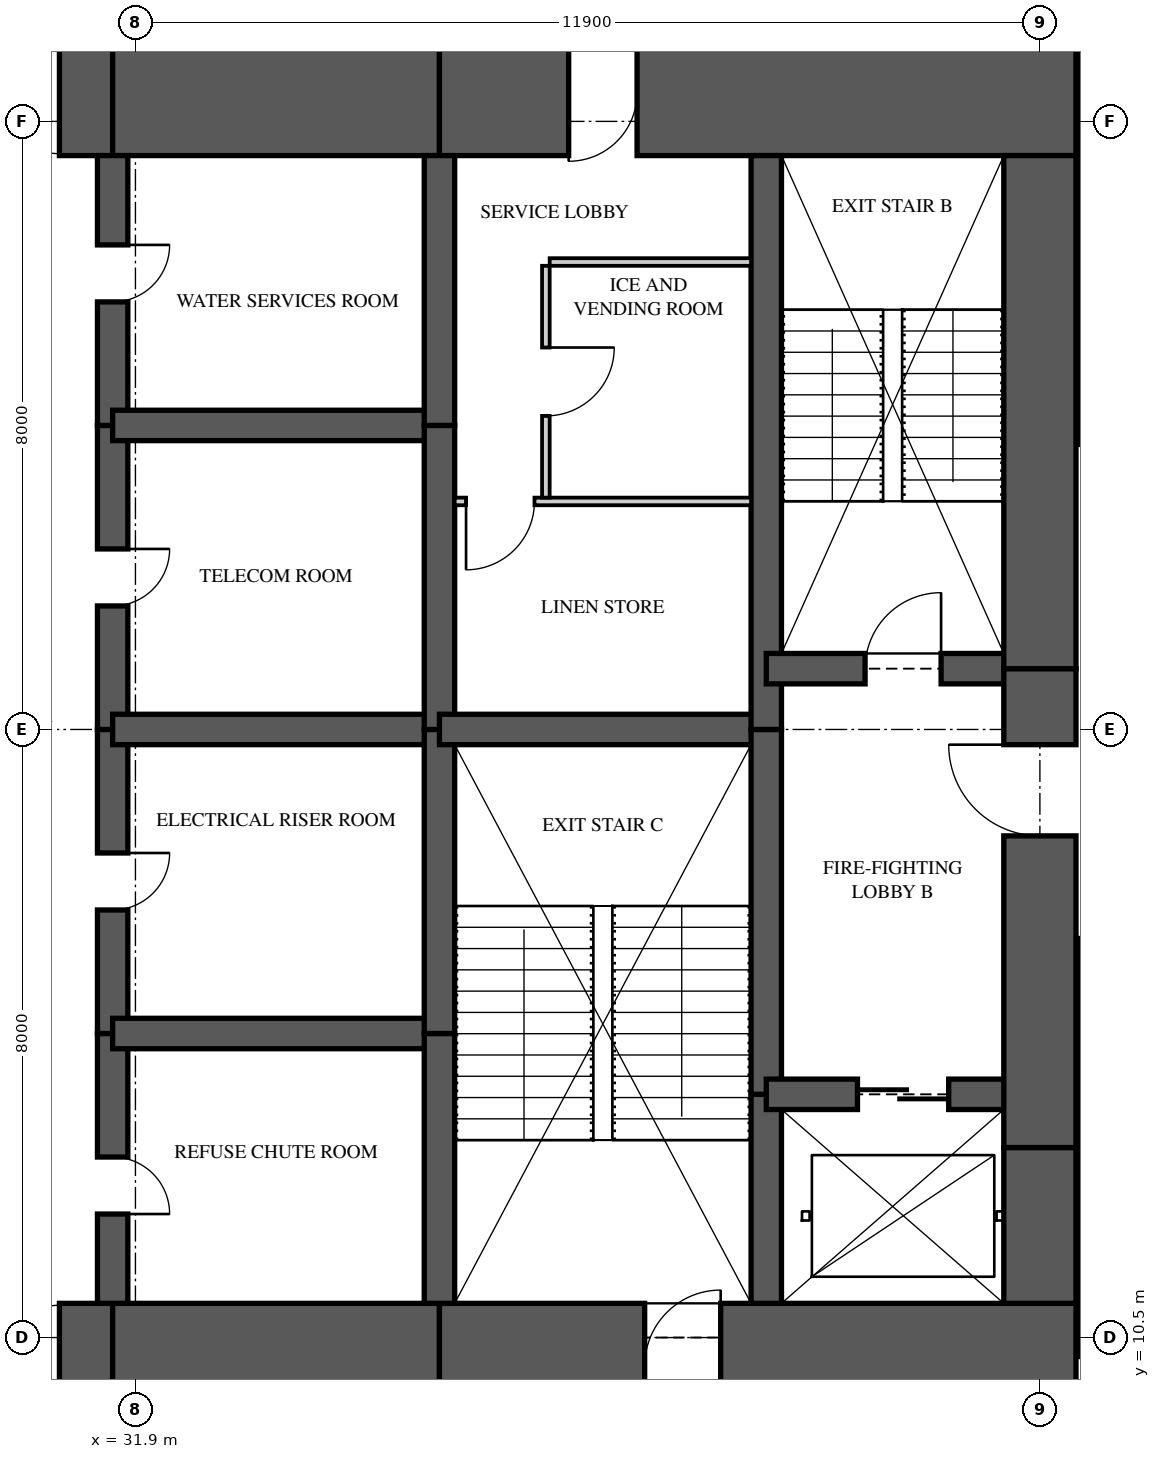
"""IFC4 building model, lengths in metres.
Left out: names, types, materials, properties, quantities, classifications, styles, units other than length and angle.
Written with IfcOpenShell. Run it as: python <this file> out.ifc"""

import sys

from ifc_helpers import new_model, si_unit, direction, frame, frame_2d, origin, place, context, subcontext, project, spatial, rectangle, extrude, element, fill, save


model = new_model("IFC4")
c1 = context("Model", 3, precision=1e-05, world=origin(), true_north=direction((0.0, 1.0)))
c2 = subcontext(c1, "Body", "Model", "MODEL_VIEW")
j1 = project(units=[si_unit("LENGTHUNIT", "METRE"), si_unit("PLANEANGLEUNIT", "RADIAN")], contexts=[c1])
p1 = place(None, origin())
s1 = spatial("IfcSite", under=j1, at=p1, CompositionType="ELEMENT")
p2 = place(p1, origin())
s2 = spatial("IfcBuilding", under=s1, at=p2, CompositionType="ELEMENT")
p3 = place(p2, frame((0.0, 0.0, 67.9)))
s3 = spatial("IfcBuildingStorey", under=s2, at=p3, CompositionType="ELEMENT", Elevation=67.9)
p4 = place(p3, frame((26.0, 10.125, 0.0), z_axis=(0.0, 0.0, 1.0), x_axis=(1.0, 0.0, 0.0)))
e1 = element("IfcWall", 1, at=p4, inside=s3, PredefinedType="SHEAR", context=c2, shape_type="SweptSolid", body=[
    extrude(rectangle(XDim=5.6, YDim=1.65, at=frame_2d((2.8, 0.0))), origin(), (0.0, 0.0, 1.0), 3.35),
])
p5 = place(p4, frame((3.3, 0.0, 0.0)))
e2 = element("IfcOpeningElement", 2, at=p5, cuts=e1, PredefinedType="OPENING", context=c2, shape_type="SweptSolid", body=[
    extrude(rectangle(XDim=1.6, YDim=2.1, at=frame_2d((0.8, 1.05))), frame((0.0, 0.835, 0.0), z_axis=(0.0, -1.0, 0.0), x_axis=(1.0, 0.0, 0.0)), (0.0, 0.0, 1.0), 1.67),
])
p6 = place(p3, frame((31.6, 10.125, 0.0), z_axis=(0.0, 0.0, 1.0), x_axis=(1.0, 0.0, 0.0)))
e3 = element("IfcWall", 3, at=p6, inside=s3, PredefinedType="SHEAR", context=c2, shape_type="SweptSolid", body=[
    extrude(rectangle(XDim=4.3, YDim=1.65, at=frame_2d((2.15, 0.0))), origin(), (0.0, 0.0, 1.0), 3.35),
])
p7 = place(p3, frame((35.9, 10.125, 0.0), z_axis=(0.0, 0.0, 1.0), x_axis=(1.0, 0.0, 0.0)))
e4 = element("IfcWall", 4, at=p7, inside=s3, PredefinedType="SHEAR", context=c2, shape_type="SweptSolid", body=[
    extrude(rectangle(XDim=8.375, YDim=1.65, at=frame_2d((4.188, 0.0))), origin(), (0.0, 0.0, 1.0), 3.35),
])
p8 = place(p7, frame((2.7, 0.0, 0.0)))
e5 = element("IfcOpeningElement", 5, at=p8, cuts=e4, PredefinedType="OPENING", context=c2, shape_type="SweptSolid", body=[
    extrude(rectangle(XDim=1.0, YDim=2.1, at=frame_2d((0.5, 1.05))), frame((0.0, 0.835, 0.0), z_axis=(0.0, -1.0, 0.0), x_axis=(1.0, 0.0, 0.0)), (0.0, 0.0, 1.0), 1.67),
])
p9 = place(p3, frame((44.275, 26.875, 0.0), z_axis=(0.0, 0.0, 1.0), x_axis=(-1.0, 0.0, 0.0)))
e6 = element("IfcWall", 6, at=p9, inside=s3, PredefinedType="SHEAR", context=c2, shape_type="SweptSolid", body=[
    extrude(rectangle(XDim=8.375, YDim=1.65, at=frame_2d((4.188, 0.0))), origin(), (0.0, 0.0, 1.0), 3.35),
])
p10 = place(p9, frame((5.775, 0.0, 0.0)))
e7 = element("IfcOpeningElement", 7, at=p10, cuts=e6, PredefinedType="OPENING", context=c2, shape_type="SweptSolid", body=[
    extrude(rectangle(XDim=0.9, YDim=2.1, at=frame_2d((0.45, 1.05))), frame((0.0, 0.835, 0.0), z_axis=(0.0, -1.0, 0.0), x_axis=(1.0, 0.0, 0.0)), (0.0, 0.0, 1.0), 1.67),
])
p11 = place(p3, frame((35.9, 26.875, 0.0), z_axis=(0.0, 0.0, 1.0), x_axis=(-1.0, 0.0, 0.0)))
e8 = element("IfcWall", 8, at=p11, inside=s3, PredefinedType="SHEAR", context=c2, shape_type="SweptSolid", body=[
    extrude(rectangle(XDim=4.3, YDim=1.65, at=frame_2d((2.15, 0.0))), origin(), (0.0, 0.0, 1.0), 3.35),
])
p12 = place(p3, frame((31.6, 26.875, 0.0), z_axis=(0.0, 0.0, 1.0), x_axis=(-1.0, 0.0, 0.0)))
e9 = element("IfcWall", 9, at=p12, inside=s3, PredefinedType="SHEAR", context=c2, shape_type="SweptSolid", body=[
    extrude(rectangle(XDim=5.6, YDim=1.65, at=frame_2d((2.8, 0.0))), origin(), (0.0, 0.0, 1.0), 3.35),
])
p13 = place(p12, frame((0.7, 0.0, 0.0)))
e10 = element("IfcOpeningElement", 10, at=p13, cuts=e9, PredefinedType="OPENING", context=c2, shape_type="SweptSolid", body=[
    extrude(rectangle(XDim=1.6, YDim=2.1, at=frame_2d((0.8, 1.05))), frame((0.0, 0.835, 0.0), z_axis=(0.0, -1.0, 0.0), x_axis=(1.0, 0.0, 0.0)), (0.0, 0.0, 1.0), 1.67),
])
p14 = place(p3, frame((43.8, 10.95, 0.0), z_axis=(0.0, 0.0, 1.0), x_axis=(0.0, 1.0, 0.0)))
e11 = element("IfcWall", 11, at=p14, inside=s3, PredefinedType="SHEAR", context=c2, shape_type="SweptSolid", body=[
    extrude(rectangle(XDim=2.05, YDim=0.95, at=frame_2d((1.025, 0.0))), origin(), (0.0, 0.0, 1.0), 3.35),
])
p15 = place(p3, frame((43.8, 13.0, 0.0), z_axis=(0.0, 0.0, 1.0), x_axis=(0.0, 1.0, 0.0)))
e12 = element("IfcWall", 12, at=p15, inside=s3, PredefinedType="SHEAR", context=c2, shape_type="SweptSolid", body=[
    extrude(rectangle(XDim=6.3, YDim=0.95, at=frame_2d((3.15, 0.0))), origin(), (0.0, 0.0, 1.0), 3.35),
])
p16 = place(p15, frame((4.1, 0.0, 0.0)))
e13 = element("IfcOpeningElement", 13, at=p16, cuts=e12, PredefinedType="OPENING", context=c2, shape_type="SweptSolid", body=[
    extrude(rectangle(XDim=1.2, YDim=2.2, at=frame_2d((0.6, 1.1))), frame((0.0, 0.485, 0.0), z_axis=(0.0, -1.0, 0.0), x_axis=(1.0, 0.0, 0.0)), (0.0, 0.0, 1.0), 0.97),
])
p17 = place(p3, frame((43.8, 19.3, 0.0), z_axis=(0.0, 0.0, 1.0), x_axis=(0.0, 1.0, 0.0)))
e14 = element("IfcWall", 14, at=p17, inside=s3, PredefinedType="SHEAR", context=c2, shape_type="SweptSolid", body=[
    extrude(rectangle(XDim=6.75, YDim=0.95, at=frame_2d((3.375, 0.0))), origin(), (0.0, 0.0, 1.0), 3.35),
])
p18 = place(p3, frame((31.6, 10.95, 0.0), z_axis=(0.0, 0.0, 1.0), x_axis=(0.0, 1.0, 0.0)))
e15 = element("IfcWall", 15, at=p18, inside=s3, PredefinedType="SHEAR", context=c2, shape_type="SweptSolid", body=[
    extrude(rectangle(XDim=3.55, YDim=0.4, at=frame_2d((1.775, 0.0))), origin(), (0.0, 0.0, 1.0), 3.35),
])
p19 = place(p18, frame((1.175, 0.0, 0.0)))
e16 = element("IfcOpeningElement", 16, at=p19, cuts=e15, PredefinedType="OPENING", context=c2, shape_type="SweptSolid", body=[
    extrude(rectangle(XDim=0.75, YDim=2.1, at=frame_2d((0.375, 1.05))), frame((0.0, 0.21, 0.0), z_axis=(0.0, -1.0, 0.0), x_axis=(1.0, 0.0, 0.0)), (0.0, 0.0, 1.0), 0.42),
])
p20 = place(p3, frame((31.6, 14.5, 0.0), z_axis=(0.0, 0.0, 1.0), x_axis=(0.0, 1.0, 0.0)))
e17 = element("IfcWall", 17, at=p20, inside=s3, PredefinedType="SHEAR", context=c2, shape_type="SweptSolid", body=[
    extrude(rectangle(XDim=4.0, YDim=0.4, at=frame_2d((2.0, 0.0))), origin(), (0.0, 0.0, 1.0), 3.35),
])
p21 = place(p20, frame((1.625, 0.0, 0.0)))
e18 = element("IfcOpeningElement", 18, at=p21, cuts=e17, PredefinedType="OPENING", context=c2, shape_type="SweptSolid", body=[
    extrude(rectangle(XDim=0.75, YDim=2.1, at=frame_2d((0.375, 1.05))), frame((0.0, 0.21, 0.0), z_axis=(0.0, -1.0, 0.0), x_axis=(1.0, 0.0, 0.0)), (0.0, 0.0, 1.0), 0.42),
])
p22 = place(p3, frame((31.6, 18.5, 0.0), z_axis=(0.0, 0.0, 1.0), x_axis=(0.0, 1.0, 0.0)))
e19 = element("IfcWall", 19, at=p22, inside=s3, PredefinedType="SHEAR", context=c2, shape_type="SweptSolid", body=[
    extrude(rectangle(XDim=4.0, YDim=0.4, at=frame_2d((2.0, 0.0))), origin(), (0.0, 0.0, 1.0), 3.35),
])
p23 = place(p22, frame((1.625, 0.0, 0.0)))
e20 = element("IfcOpeningElement", 20, at=p23, cuts=e19, PredefinedType="OPENING", context=c2, shape_type="SweptSolid", body=[
    extrude(rectangle(XDim=0.75, YDim=2.1, at=frame_2d((0.375, 1.05))), frame((0.0, 0.21, 0.0), z_axis=(0.0, -1.0, 0.0), x_axis=(1.0, 0.0, 0.0)), (0.0, 0.0, 1.0), 0.42),
])
p24 = place(p3, frame((31.6, 22.5, 0.0), z_axis=(0.0, 0.0, 1.0), x_axis=(0.0, 1.0, 0.0)))
e21 = element("IfcWall", 21, at=p24, inside=s3, PredefinedType="SHEAR", context=c2, shape_type="SweptSolid", body=[
    extrude(rectangle(XDim=3.55, YDim=0.4, at=frame_2d((1.775, 0.0))), origin(), (0.0, 0.0, 1.0), 3.35),
])
p25 = place(p24, frame((1.625, 0.0, 0.0)))
e22 = element("IfcOpeningElement", 22, at=p25, cuts=e21, PredefinedType="OPENING", context=c2, shape_type="SweptSolid", body=[
    extrude(rectangle(XDim=0.75, YDim=2.1, at=frame_2d((0.375, 1.05))), frame((0.0, 0.21, 0.0), z_axis=(0.0, -1.0, 0.0), x_axis=(1.0, 0.0, 0.0)), (0.0, 0.0, 1.0), 0.42),
])
p26 = place(p3, frame((35.9, 10.95, 0.0), z_axis=(0.0, 0.0, 1.0), x_axis=(0.0, 1.0, 0.0)))
e23 = element("IfcWall", 23, at=p26, inside=s3, PredefinedType="SHEAR", context=c2, shape_type="SweptSolid", body=[
    extrude(rectangle(XDim=3.55, YDim=0.4, at=frame_2d((1.775, 0.0))), origin(), (0.0, 0.0, 1.0), 3.35),
])
for number, where, z_axis, x_axis in (
    (24, (35.9, 14.5, 0.0), (0.0, 0.0, 1.0), (0.0, 1.0, 0.0)),
    (25, (35.9, 18.5, 0.0), (0.0, 0.0, 1.0), (0.0, 1.0, 0.0)),
):
    element("IfcWall", number, at=place(p3, frame(where, z_axis=z_axis, x_axis=x_axis)), inside=s3, PredefinedType="SHEAR", context=c2, shape_type="SweptSolid", body=[
        extrude(rectangle(XDim=4.0, YDim=0.4, at=frame_2d((2.0, 0.0))), origin(), (0.0, 0.0, 1.0), 3.35),
    ])
p27 = place(p3, frame((35.9, 22.5, 0.0), z_axis=(0.0, 0.0, 1.0), x_axis=(0.0, 1.0, 0.0)))
e26 = element("IfcWall", 26, at=p27, inside=s3, PredefinedType="SHEAR", context=c2, shape_type="SweptSolid", body=[
    extrude(rectangle(XDim=3.55, YDim=0.4, at=frame_2d((1.775, 0.0))), origin(), (0.0, 0.0, 1.0), 3.35),
])
p28 = place(p3, frame((40.2, 10.95, 0.0), z_axis=(0.0, 0.0, 1.0), x_axis=(0.0, 1.0, 0.0)))
e27 = element("IfcWall", 27, at=p28, inside=s3, PredefinedType="SHEAR", context=c2, shape_type="SweptSolid", body=[
    extrude(rectangle(XDim=2.75, YDim=0.4, at=frame_2d((1.375, 0.0))), origin(), (0.0, 0.0, 1.0), 3.35),
])
p29 = place(p3, frame((40.2, 13.7, 0.0), z_axis=(0.0, 0.0, 1.0), x_axis=(0.0, 1.0, 0.0)))
e28 = element("IfcWall", 28, at=p29, inside=s3, PredefinedType="SHEAR", context=c2, shape_type="SweptSolid", body=[
    extrude(rectangle(XDim=4.8, YDim=0.4, at=frame_2d((2.4, 0.0))), origin(), (0.0, 0.0, 1.0), 3.35),
])
p30 = place(p3, frame((40.2, 18.5, 0.0), z_axis=(0.0, 0.0, 1.0), x_axis=(0.0, 1.0, 0.0)))
e29 = element("IfcWall", 29, at=p30, inside=s3, PredefinedType="SHEAR", context=c2, shape_type="SweptSolid", body=[
    extrude(rectangle(XDim=7.55, YDim=0.4, at=frame_2d((3.775, 0.0))), origin(), (0.0, 0.0, 1.0), 3.35),
])
for number, where, z_axis, x_axis in (
    (30, (31.6, 14.5, 0.0), (0.0, 0.0, 1.0), (1.0, 0.0, 0.0)),
    (31, (31.6, 18.5, 0.0), (0.0, 0.0, 1.0), (1.0, 0.0, 0.0)),
    (32, (31.6, 22.5, 0.0), (0.0, 0.0, 1.0), (1.0, 0.0, 0.0)),
):
    element("IfcWall", number, at=place(p3, frame(where, z_axis=z_axis, x_axis=x_axis)), inside=s3, PredefinedType="SHEAR", context=c2, shape_type="SweptSolid", body=[
        extrude(rectangle(XDim=4.3, YDim=0.4, at=frame_2d((2.15, 0.0))), origin(), (0.0, 0.0, 1.0), 3.35),
    ])
p31 = place(p3, frame((35.9, 18.5, 0.0), z_axis=(0.0, 0.0, 1.0), x_axis=(1.0, 0.0, 0.0)))
e33 = element("IfcWall", 33, at=p31, inside=s3, PredefinedType="SHEAR", context=c2, shape_type="SweptSolid", body=[
    extrude(rectangle(XDim=4.3, YDim=0.4, at=frame_2d((2.15, 0.0))), origin(), (0.0, 0.0, 1.0), 3.35),
])
p32 = place(p3, frame((40.2, 13.7, 0.0), z_axis=(0.0, 0.0, 1.0), x_axis=(1.0, 0.0, 0.0)))
e34 = element("IfcWall", 34, at=p32, inside=s3, PredefinedType="SHEAR", context=c2, shape_type="SweptSolid", body=[
    extrude(rectangle(XDim=3.6, YDim=0.4, at=frame_2d((1.8, 0.0))), origin(), (0.0, 0.0, 1.0), 3.35),
])
p33 = place(p32, frame((1.2, 0.0, 0.0)))
e35 = element("IfcOpeningElement", 35, at=p33, cuts=e34, PredefinedType="OPENING", context=c2, shape_type="SweptSolid", body=[
    extrude(rectangle(XDim=1.2, YDim=2.1, at=frame_2d((0.6, 1.05))), frame((0.0, 0.21, 0.0), z_axis=(0.0, -1.0, 0.0), x_axis=(1.0, 0.0, 0.0)), (0.0, 0.0, 1.0), 0.42),
])
p34 = place(p3, frame((40.2, 19.3, 0.0), z_axis=(0.0, 0.0, 1.0), x_axis=(1.0, 0.0, 0.0)))
e36 = element("IfcWall", 36, at=p34, inside=s3, PredefinedType="SHEAR", context=c2, shape_type="SweptSolid", body=[
    extrude(rectangle(XDim=3.6, YDim=0.4, at=frame_2d((1.8, 0.0))), origin(), (0.0, 0.0, 1.0), 3.35),
])
p35 = place(p34, frame((1.3, 0.0, 0.0)))
e37 = element("IfcOpeningElement", 37, at=p35, cuts=e36, PredefinedType="OPENING", context=c2, shape_type="SweptSolid", body=[
    extrude(rectangle(XDim=1.0, YDim=2.1, at=frame_2d((0.5, 1.05))), frame((0.0, 0.21, 0.0), z_axis=(0.0, -1.0, 0.0), x_axis=(1.0, 0.0, 0.0)), (0.0, 0.0, 1.0), 0.42),
])
p36 = place(p3, frame((37.35, 24.65, 0.0), z_axis=(0.0, 0.0, 1.0), x_axis=(1.0, 0.0, 0.0)))
e38 = element("IfcWall", 38, at=p36, inside=s3, PredefinedType="PARTITIONING", context=c2, shape_type="SweptSolid", body=[
    extrude(rectangle(XDim=2.65, YDim=0.1, at=frame_2d((1.325, 0.0))), origin(), (0.0, 0.0, 1.0), 3.11),
])
p37 = place(p3, frame((37.3, 21.55, 0.0), z_axis=(0.0, 0.0, 1.0), x_axis=(0.0, 1.0, 0.0)))
e39 = element("IfcWall", 39, at=p37, inside=s3, PredefinedType="PARTITIONING", context=c2, shape_type="SweptSolid", body=[
    extrude(rectangle(XDim=3.05, YDim=0.1, at=frame_2d((1.525, 0.0))), origin(), (0.0, 0.0, 1.0), 3.11),
])
p38 = place(p37, frame((1.075, 0.0, 0.0)))
e40 = element("IfcOpeningElement", 40, at=p38, cuts=e39, PredefinedType="OPENING", context=c2, shape_type="SweptSolid", body=[
    extrude(rectangle(XDim=0.9, YDim=2.1, at=frame_2d((0.45, 1.05))), frame((0.0, 0.06, 0.0), z_axis=(0.0, -1.0, 0.0), x_axis=(1.0, 0.0, 0.0)), (0.0, 0.0, 1.0), 0.12),
])
p39 = place(p3, frame((36.1, 21.5, 0.0), z_axis=(0.0, 0.0, 1.0), x_axis=(1.0, 0.0, 0.0)))
e41 = element("IfcWall", 41, at=p39, inside=s3, PredefinedType="PARTITIONING", context=c2, shape_type="SweptSolid", body=[
    extrude(rectangle(XDim=3.9, YDim=0.1, at=frame_2d((1.95, 0.0))), origin(), (0.0, 0.0, 1.0), 3.11),
])
p40 = place(p39, frame((0.15, 0.0, 0.0)))
e42 = element("IfcOpeningElement", 42, at=p40, cuts=e41, PredefinedType="OPENING", context=c2, shape_type="SweptSolid", body=[
    extrude(rectangle(XDim=0.9, YDim=2.1, at=frame_2d((0.45, 1.05))), frame((0.0, 0.06, 0.0), z_axis=(0.0, -1.0, 0.0), x_axis=(1.0, 0.0, 0.0)), (0.0, 0.0, 1.0), 0.12),
])
p41 = place(p38, frame((0.9, 0.0, 0.0), z_axis=(0.0, 0.0, 1.0), x_axis=(-1.0, 0.0, 0.0)))
e43 = element("IfcDoor", 43, at=p41, inside=s3, OperationType="SINGLE_SWING_LEFT", PredefinedType="DOOR", context=c2, shape_type="SweptSolid", body=[
    extrude(rectangle(XDim=0.9, YDim=2.1, at=frame_2d((0.45, 1.05))), frame((0.0, 0.025, 0.0), z_axis=(0.0, -1.0, 0.0), x_axis=(1.0, 0.0, 0.0)), (0.0, 0.0, 1.0), 0.05),
])
fill(e40, e43)
p42 = place(p40, frame((0.9, 0.0, 0.0), z_axis=(0.0, 0.0, 1.0), x_axis=(-1.0, 0.0, 0.0)))
e44 = element("IfcDoor", 44, at=p42, inside=s3, OperationType="SINGLE_SWING_RIGHT", PredefinedType="DOOR", context=c2, shape_type="SweptSolid", body=[
    extrude(rectangle(XDim=0.9, YDim=2.1, at=frame_2d((0.45, 1.05))), frame((0.0, 0.025, 0.0), z_axis=(0.0, -1.0, 0.0), x_axis=(1.0, 0.0, 0.0)), (0.0, 0.0, 1.0), 0.05),
])
fill(e42, e44)
p43 = place(p35, origin())
e45 = element("IfcDoor", 45, at=p43, inside=s3, OperationType="SINGLE_SWING_RIGHT", PredefinedType="DOOR", context=c2, shape_type="SweptSolid", body=[
    extrude(rectangle(XDim=1.0, YDim=2.1, at=frame_2d((0.5, 1.05))), frame((0.0, 0.025, 0.0), z_axis=(0.0, -1.0, 0.0), x_axis=(1.0, 0.0, 0.0)), (0.0, 0.0, 1.0), 0.05),
])
fill(e37, e45)
p44 = place(p16, origin())
e46 = element("IfcDoor", 46, at=p44, inside=s3, OperationType="SINGLE_SWING_RIGHT", PredefinedType="DOOR", context=c2, shape_type="SweptSolid", body=[
    extrude(rectangle(XDim=1.2, YDim=2.2, at=frame_2d((0.6, 1.1))), frame((0.0, 0.025, 0.0), z_axis=(0.0, -1.0, 0.0), x_axis=(1.0, 0.0, 0.0)), (0.0, 0.0, 1.0), 0.05),
])
fill(e13, e46)
p45 = place(p33, origin())
e47 = element("IfcDoor", 47, at=p45, inside=s3, OperationType="SLIDING_TO_LEFT", PredefinedType="DOOR", context=c2, shape_type="SweptSolid", body=[
    extrude(rectangle(XDim=1.2, YDim=2.1, at=frame_2d((0.6, 1.05))), frame((0.0, 0.025, 0.0), z_axis=(0.0, -1.0, 0.0), x_axis=(1.0, 0.0, 0.0)), (0.0, 0.0, 1.0), 0.05),
])
fill(e35, e47)
p46 = place(p5, origin())
e48 = element("IfcDoor", 48, at=p46, inside=s3, OperationType="DOUBLE_DOOR_SINGLE_SWING", PredefinedType="DOOR", context=c2, shape_type="SweptSolid", body=[
    extrude(rectangle(XDim=1.6, YDim=2.1, at=frame_2d((0.8, 1.05))), frame((0.0, 0.025, 0.0), z_axis=(0.0, -1.0, 0.0), x_axis=(1.0, 0.0, 0.0)), (0.0, 0.0, 1.0), 0.05),
])
fill(e2, e48)
p47 = place(p13, origin())
e49 = element("IfcDoor", 49, at=p47, inside=s3, OperationType="DOUBLE_DOOR_SINGLE_SWING", PredefinedType="DOOR", context=c2, shape_type="SweptSolid", body=[
    extrude(rectangle(XDim=1.6, YDim=2.1, at=frame_2d((0.8, 1.05))), frame((0.0, 0.025, 0.0), z_axis=(0.0, -1.0, 0.0), x_axis=(1.0, 0.0, 0.0)), (0.0, 0.0, 1.0), 0.05),
])
fill(e10, e49)
p48 = place(p19, frame((0.75, 0.0, 0.0), z_axis=(0.0, 0.0, 1.0), x_axis=(-1.0, 0.0, 0.0)))
e50 = element("IfcDoor", 50, at=p48, inside=s3, OperationType="SINGLE_SWING_RIGHT", PredefinedType="DOOR", context=c2, shape_type="SweptSolid", body=[
    extrude(rectangle(XDim=0.75, YDim=2.1, at=frame_2d((0.375, 1.05))), frame((0.0, 0.025, 0.0), z_axis=(0.0, -1.0, 0.0), x_axis=(1.0, 0.0, 0.0)), (0.0, 0.0, 1.0), 0.05),
])
fill(e16, e50)
p49 = place(p21, frame((0.75, 0.0, 0.0), z_axis=(0.0, 0.0, 1.0), x_axis=(-1.0, 0.0, 0.0)))
e51 = element("IfcDoor", 51, at=p49, inside=s3, OperationType="SINGLE_SWING_LEFT", PredefinedType="DOOR", context=c2, shape_type="SweptSolid", body=[
    extrude(rectangle(XDim=0.75, YDim=2.1, at=frame_2d((0.375, 1.05))), frame((0.0, 0.025, 0.0), z_axis=(0.0, -1.0, 0.0), x_axis=(1.0, 0.0, 0.0)), (0.0, 0.0, 1.0), 0.05),
])
fill(e18, e51)
p50 = place(p23, frame((0.75, 0.0, 0.0), z_axis=(0.0, 0.0, 1.0), x_axis=(-1.0, 0.0, 0.0)))
e52 = element("IfcDoor", 52, at=p50, inside=s3, OperationType="SINGLE_SWING_LEFT", PredefinedType="DOOR", context=c2, shape_type="SweptSolid", body=[
    extrude(rectangle(XDim=0.75, YDim=2.1, at=frame_2d((0.375, 1.05))), frame((0.0, 0.025, 0.0), z_axis=(0.0, -1.0, 0.0), x_axis=(1.0, 0.0, 0.0)), (0.0, 0.0, 1.0), 0.05),
])
fill(e20, e52)
p51 = place(p25, frame((0.75, 0.0, 0.0), z_axis=(0.0, 0.0, 1.0), x_axis=(-1.0, 0.0, 0.0)))
e53 = element("IfcDoor", 53, at=p51, inside=s3, OperationType="SINGLE_SWING_LEFT", PredefinedType="DOOR", context=c2, shape_type="SweptSolid", body=[
    extrude(rectangle(XDim=0.75, YDim=2.1, at=frame_2d((0.375, 1.05))), frame((0.0, 0.025, 0.0), z_axis=(0.0, -1.0, 0.0), x_axis=(1.0, 0.0, 0.0)), (0.0, 0.0, 1.0), 0.05),
])
fill(e22, e53)
p52 = place(p8, origin())
e54 = element("IfcDoor", 54, at=p52, inside=s3, OperationType="SINGLE_SWING_RIGHT", PredefinedType="DOOR", context=c2, shape_type="SweptSolid", body=[
    extrude(rectangle(XDim=1.0, YDim=2.1, at=frame_2d((0.5, 1.05))), frame((0.0, 0.025, 0.0), z_axis=(0.0, -1.0, 0.0), x_axis=(1.0, 0.0, 0.0)), (0.0, 0.0, 1.0), 0.05),
])
fill(e5, e54)
p53 = place(p10, origin())
e55 = element("IfcDoor", 55, at=p53, inside=s3, OperationType="SINGLE_SWING_RIGHT", PredefinedType="DOOR", context=c2, shape_type="SweptSolid", body=[
    extrude(rectangle(XDim=0.9, YDim=2.1, at=frame_2d((0.45, 1.05))), frame((0.0, 0.47, 0.0), z_axis=(0.0, -1.0, 0.0), x_axis=(1.0, 0.0, 0.0)), (0.0, 0.0, 1.0), 0.8),
])
fill(e7, e55)
save(model, sys.argv[1])
